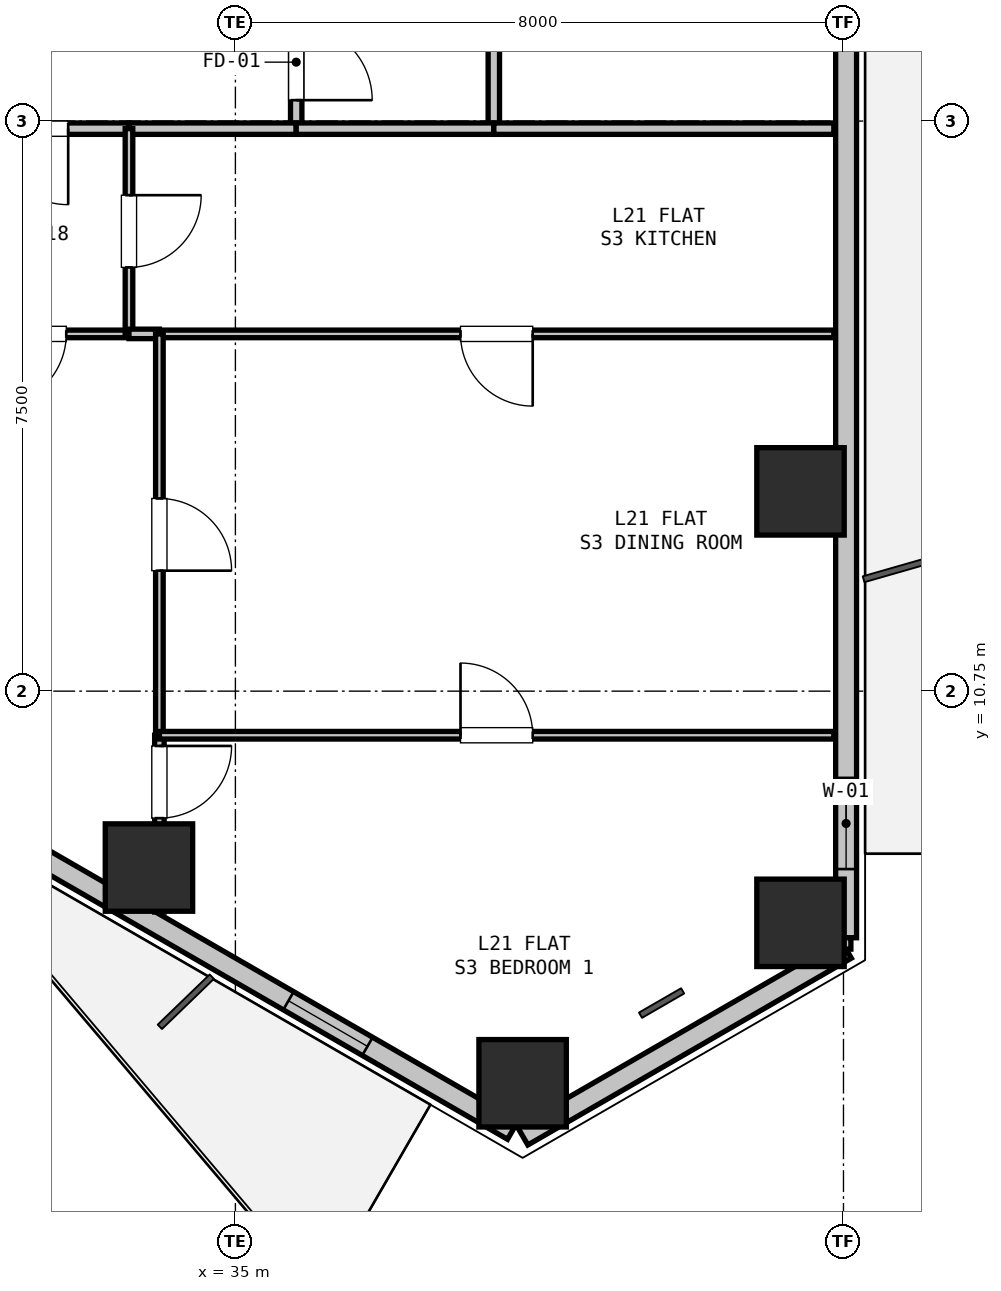
"""IFC4 building model, lengths in metres.
Left out: names, types, materials, properties, quantities, classifications, styles, units other than length and angle.
Written with IfcOpenShell. Run it as: python <this file> out.ifc"""

import sys

from ifc_helpers import new_model, si_unit, direction, frame, frame_2d, origin, origin_2d, place, context, subcontext, project, spatial, rectangle, hollow_rectangle, extrude, element, fill, save


model = new_model("IFC4")
c1 = context("Model", 3, precision=1e-05, world=origin(), true_north=direction((0.0, 1.0)))
c2 = subcontext(c1, "Body", "Model", "MODEL_VIEW")
j1 = project(units=[si_unit("LENGTHUNIT", "METRE"), si_unit("PLANEANGLEUNIT", "RADIAN")], contexts=[c1])
p1 = place(None, origin())
s1 = spatial("IfcSite", under=j1, at=p1, CompositionType="ELEMENT")
p2 = place(p1, origin())
s2 = spatial("IfcBuilding", under=s1, at=p2, CompositionType="ELEMENT")
p3 = place(p2, frame((0.0, 0.0, 80.1)))
s3 = spatial("IfcBuildingStorey", under=s2, at=p3, CompositionType="ELEMENT", Elevation=80.1)
for number, where, z_axis, x_axis in (
    (1, (42.435, 13.378, 0.0), (0.0, 0.0, 1.0), (1.0, 0.0, 0.0)),
    (2, (42.435, 7.702, 0.0), (0.0, 0.0, 1.0), (1.0, 0.0, 0.0)),
    (3, (38.779, 5.591, 0.0), (0.0, 0.0, 1.0), (1.0, 0.0, 0.0)),
    (4, (33.863, 8.429, 0.0), (0.0, 0.0, 1.0), (1.0, 0.0, 0.0)),
):
    element("IfcColumn", number, at=place(p3, frame(where, z_axis=z_axis, x_axis=x_axis)), inside=s3, PredefinedType="COLUMN", context=c2, shape_type="SweptSolid", body=[
        extrude(hollow_rectangle(XDim=1.15, YDim=1.15, WallThickness=0.032, at=origin_2d()), origin(), (0.0, 0.0, 1.0), 3.3),
    ])
p4 = place(p3, frame((43.035, 7.356, 0.0), z_axis=(0.0, 0.0, 1.0), x_axis=(-0.866011848704, -0.500023477353, 0.0)))
e5 = element("IfcWall", 5, at=p4, inside=s3, PredefinedType="SOLIDWALL", context=c2, shape_type="SweptSolid", body=[
    extrude(rectangle(XDim=4.914, YDim=0.275, at=frame_2d((2.457, 0.0))), origin(), (0.0, 0.0, 1.0), 2.67),
])
p5 = place(p3, frame((43.035, 19.435, 0.0), z_axis=(0.0, 0.0, 1.0), x_axis=(0.0, -1.0, 0.0)))
e6 = element("IfcWall", 6, at=p5, inside=s3, PredefinedType="SOLIDWALL", context=c2, shape_type="SweptSolid", body=[
    extrude(rectangle(XDim=11.93, YDim=0.275, at=frame_2d((5.965, 0.0))), origin(), (0.0, 0.0, 1.0), 2.67),
])
p6 = place(p5, frame((9.826, 0.0, 0.9)))
e7 = element("IfcOpeningElement", 7, at=p6, cuts=e6, PredefinedType="OPENING", context=c2, shape_type="SweptSolid", body=[
    extrude(rectangle(XDim=1.2, YDim=1.4, at=frame_2d((0.6, 0.7))), frame((0.0, 0.147, 0.0), z_axis=(0.0, -1.0, 0.0), x_axis=(1.0, 0.0, 0.0)), (0.0, 0.0, 1.0), 0.295),
])
p7 = place(p3, frame((38.649, 4.973, 0.0), z_axis=(0.0, 0.0, 1.0), x_axis=(-0.866023023012, 0.500004123596, 0.0)))
e8 = element("IfcWall", 8, at=p7, inside=s3, PredefinedType="SOLIDWALL", context=c2, shape_type="SweptSolid", body=[
    extrude(rectangle(XDim=11.93, YDim=0.275, at=frame_2d((5.965, 0.0))), origin(), (0.0, 0.0, 1.0), 2.67),
])
p8 = place(p7, frame((7.616, 0.0, 0.0)))
e9 = element("IfcOpeningElement", 9, at=p8, cuts=e8, PredefinedType="OPENING", context=c2, shape_type="SweptSolid", body=[
    extrude(rectangle(XDim=1.1, YDim=2.1, at=frame_2d((0.55, 1.05))), frame((0.0, 0.147, 0.0), z_axis=(0.0, -1.0, 0.0), x_axis=(1.0, 0.0, 0.0)), (0.0, 0.0, 1.0), 0.295),
])
p9 = place(p7, frame((2.207, 0.0, 0.9)))
e10 = element("IfcOpeningElement", 10, at=p9, cuts=e8, PredefinedType="OPENING", context=c2, shape_type="SweptSolid", body=[
    extrude(rectangle(XDim=1.2, YDim=1.4, at=frame_2d((0.6, 0.7))), frame((0.0, 0.147, 0.0), z_axis=(0.0, -1.0, 0.0), x_axis=(1.0, 0.0, 0.0)), (0.0, 0.0, 1.0), 0.295),
])
p10 = place(p3, frame((35.8, 19.9, 0.0), z_axis=(0.0, 0.0, 1.0), x_axis=(0.0, -1.0, 0.0)))
e11 = element("IfcWall", 11, at=p10, inside=s3, PredefinedType="PARTITIONING", context=c2, shape_type="SweptSolid", body=[
    extrude(rectangle(XDim=1.75, YDim=0.15, at=frame_2d((0.875, 0.0))), origin(), (0.0, 0.0, 1.0), 3.05),
])
p11 = place(p10, frame((0.375, 0.0, 0.0)))
e12 = element("IfcOpeningElement", 12, at=p11, cuts=e11, PredefinedType="OPENING", context=c2, shape_type="SweptSolid", body=[
    extrude(rectangle(XDim=1.0, YDim=2.15, at=frame_2d((0.5, 1.075))), frame((0.0, 0.085, 0.0), z_axis=(0.0, -1.0, 0.0), x_axis=(1.0, 0.0, 0.0)), (0.0, 0.0, 1.0), 0.17),
])
p12 = place(p3, frame((35.8, 18.15, 0.0), z_axis=(0.0, 0.0, 1.0), x_axis=(-1.0, 0.0, 0.0)))
e13 = element("IfcWall", 13, at=p12, inside=s3, PredefinedType="PARTITIONING", context=c2, shape_type="SweptSolid", body=[
    extrude(rectangle(XDim=2.2, YDim=0.15, at=frame_2d((1.1, 0.0))), origin(), (0.0, 0.0, 1.0), 3.05),
])
p13 = place(p3, frame((33.6, 18.15, 0.0), z_axis=(0.0, 0.0, 1.0), x_axis=(-1.0, 0.0, 0.0)))
e14 = element("IfcWall", 14, at=p13, inside=s3, PredefinedType="PARTITIONING", context=c2, shape_type="SweptSolid", body=[
    extrude(rectangle(XDim=2.6, YDim=0.15, at=frame_2d((1.3, 0.0))), origin(), (0.0, 0.0, 1.0), 3.05),
])
p14 = place(p13, frame((0.8, 0.0, 0.0)))
e15 = element("IfcOpeningElement", 15, at=p14, cuts=e14, PredefinedType="OPENING", context=c2, shape_type="SweptSolid", body=[
    extrude(rectangle(XDim=1.0, YDim=2.15, at=frame_2d((0.5, 1.075))), frame((0.0, 0.085, 0.0), z_axis=(0.0, -1.0, 0.0), x_axis=(1.0, 0.0, 0.0)), (0.0, 0.0, 1.0), 0.17),
])
p15 = place(p3, frame((38.4, 21.4, 0.0), z_axis=(0.0, 0.0, 1.0), x_axis=(0.0, -1.0, 0.0)))
e16 = element("IfcWall", 16, at=p15, inside=s3, PredefinedType="PARTITIONING", context=c2, shape_type="SweptSolid", body=[
    extrude(rectangle(XDim=3.25, YDim=0.15, at=frame_2d((1.625, 0.0))), origin(), (0.0, 0.0, 1.0), 3.05),
])
p16 = place(p3, frame((38.4, 18.15, 0.0), z_axis=(0.0, 0.0, 1.0), x_axis=(-1.0, 0.0, 0.0)))
e17 = element("IfcWall", 17, at=p16, inside=s3, PredefinedType="PARTITIONING", context=c2, shape_type="SweptSolid", body=[
    extrude(rectangle(XDim=2.6, YDim=0.15, at=frame_2d((1.3, 0.0))), origin(), (0.0, 0.0, 1.0), 2.423),
])
p17 = place(p3, frame((33.6, 15.45, 0.0), z_axis=(0.0, 0.0, 1.0), x_axis=(-1.0, 0.0, 0.0)))
e18 = element("IfcWall", 18, at=p17, inside=s3, PredefinedType="PARTITIONING", context=c2, shape_type="SweptSolid", body=[
    extrude(rectangle(XDim=2.6, YDim=0.1, at=frame_2d((1.3, 0.0))), origin(), (0.0, 0.0, 1.0), 3.05),
])
p18 = place(p17, frame((0.825, 0.0, 0.0)))
e19 = element("IfcOpeningElement", 19, at=p18, cuts=e18, PredefinedType="OPENING", context=c2, shape_type="SweptSolid", body=[
    extrude(rectangle(XDim=0.95, YDim=2.1, at=frame_2d((0.475, 1.05))), frame((0.0, 0.06, 0.0), z_axis=(0.0, -1.0, 0.0), x_axis=(1.0, 0.0, 0.0)), (0.0, 0.0, 1.0), 0.12),
])
p19 = place(p3, frame((33.6, 18.15, 0.0), z_axis=(0.0, 0.0, 1.0), x_axis=(0.0, -1.0, 0.0)))
e20 = element("IfcWall", 20, at=p19, inside=s3, PredefinedType="PARTITIONING", context=c2, shape_type="SweptSolid", body=[
    extrude(rectangle(XDim=2.7, YDim=0.1, at=frame_2d((1.35, 0.0))), origin(), (0.0, 0.0, 1.0), 3.05),
])
p20 = place(p19, frame((0.875, 0.0, 0.0)))
e21 = element("IfcOpeningElement", 21, at=p20, cuts=e20, PredefinedType="OPENING", context=c2, shape_type="SweptSolid", body=[
    extrude(rectangle(XDim=0.95, YDim=2.1, at=frame_2d((0.475, 1.05))), frame((0.0, 0.06, 0.0), z_axis=(0.0, -1.0, 0.0), x_axis=(1.0, 0.0, 0.0)), (0.0, 0.0, 1.0), 0.12),
])
p21 = place(p3, frame((38.4, 18.15, 0.0), z_axis=(0.0, 0.0, 1.0), x_axis=(1.0, 0.0, 0.0)))
e22 = element("IfcWall", 22, at=p21, inside=s3, PredefinedType="PARTITIONING", context=c2, shape_type="SweptSolid", body=[
    extrude(rectangle(XDim=4.473, YDim=0.15, at=frame_2d((2.237, 0.0))), origin(), (0.0, 0.0, 1.0), 2.365),
])
p22 = place(p3, frame((42.873, 15.45, 0.0), z_axis=(0.0, 0.0, 1.0), x_axis=(-1.0, 0.0, 0.0)))
e23 = element("IfcWall", 23, at=p22, inside=s3, PredefinedType="PARTITIONING", context=c2, shape_type="SweptSolid", body=[
    extrude(rectangle(XDim=8.873, YDim=0.1, at=frame_2d((4.437, 0.0))), origin(), (0.0, 0.0, 1.0), 2.365),
])
p23 = place(p22, frame((3.962, 0.0, 0.0)))
e24 = element("IfcOpeningElement", 24, at=p23, cuts=e23, PredefinedType="OPENING", context=c2, shape_type="SweptSolid", body=[
    extrude(rectangle(XDim=0.95, YDim=2.1, at=frame_2d((0.475, 1.05))), frame((0.0, 0.06, 0.0), z_axis=(0.0, -1.0, 0.0), x_axis=(1.0, 0.0, 0.0)), (0.0, 0.0, 1.0), 0.12),
])
p24 = place(p3, frame((34.0, 15.45, 0.0), z_axis=(0.0, 0.0, 1.0), x_axis=(-1.0, 0.0, 0.0)))
e25 = element("IfcWall", 25, at=p24, inside=s3, PredefinedType="PARTITIONING", context=c2, shape_type="SweptSolid", body=[
    extrude(rectangle(XDim=0.4, YDim=0.125, at=frame_2d((0.2, 0.0))), origin(), (0.0, 0.0, 1.0), 3.05),
])
p25 = place(p3, frame((34.0, 15.45, 0.0), z_axis=(0.0, 0.0, 1.0), x_axis=(0.0, -1.0, 0.0)))
e26 = element("IfcWall", 26, at=p25, inside=s3, PredefinedType="PARTITIONING", context=c2, shape_type="SweptSolid", body=[
    extrude(rectangle(XDim=5.28, YDim=0.1, at=frame_2d((2.64, 0.0))), origin(), (0.0, 0.0, 1.0), 3.05),
])
p26 = place(p25, frame((2.165, 0.0, 0.0)))
e27 = element("IfcOpeningElement", 27, at=p26, cuts=e26, PredefinedType="OPENING", context=c2, shape_type="SweptSolid", body=[
    extrude(rectangle(XDim=0.95, YDim=2.1, at=frame_2d((0.475, 1.05))), frame((0.0, 0.06, 0.0), z_axis=(0.0, -1.0, 0.0), x_axis=(1.0, 0.0, 0.0)), (0.0, 0.0, 1.0), 0.12),
])
p27 = place(p3, frame((34.0, 10.17, 0.0), z_axis=(0.0, 0.0, 1.0), x_axis=(0.0, -1.0, 0.0)))
e28 = element("IfcWall", 28, at=p27, inside=s3, PredefinedType="PARTITIONING", context=c2, shape_type="SweptSolid", body=[
    extrude(rectangle(XDim=2.326, YDim=0.125, at=frame_2d((1.163, 0.0))), origin(), (0.0, 0.0, 1.0), 3.05),
])
p28 = place(p27, frame((0.141, 0.0, 0.0)))
e29 = element("IfcOpeningElement", 29, at=p28, cuts=e28, PredefinedType="OPENING", context=c2, shape_type="SweptSolid", body=[
    extrude(rectangle(XDim=0.95, YDim=2.1, at=frame_2d((0.475, 1.05))), frame((0.0, 0.073, 0.0), z_axis=(0.0, -1.0, 0.0), x_axis=(1.0, 0.0, 0.0)), (0.0, 0.0, 1.0), 0.145),
])
p29 = place(p3, frame((34.0, 10.17, 0.0), z_axis=(0.0, 0.0, 1.0), x_axis=(1.0, 0.0, 0.0)))
e30 = element("IfcWall", 30, at=p29, inside=s3, PredefinedType="PARTITIONING", context=c2, shape_type="SweptSolid", body=[
    extrude(rectangle(XDim=8.873, YDim=0.1, at=frame_2d((4.437, 0.0))), origin(), (0.0, 0.0, 1.0), 2.423),
])
p30 = place(p29, frame((3.962, 0.0, 0.0)))
e31 = element("IfcOpeningElement", 31, at=p30, cuts=e30, PredefinedType="OPENING", context=c2, shape_type="SweptSolid", body=[
    extrude(rectangle(XDim=0.95, YDim=2.1, at=frame_2d((0.475, 1.05))), frame((0.0, 0.06, 0.0), z_axis=(0.0, -1.0, 0.0), x_axis=(1.0, 0.0, 0.0)), (0.0, 0.0, 1.0), 0.12),
])
p31 = place(p3, frame((43.035, 7.506, 0.0), z_axis=(0.0, 0.0, 1.0), x_axis=(0.0, -1.0, 0.0)))
e32 = element("IfcWall", 32, at=p31, inside=s3, PredefinedType="PARTITIONING", context=c2, shape_type="SweptSolid", body=[
    extrude(rectangle(XDim=0.15, YDim=0.125, at=frame_2d((0.075, 0.0))), origin(), (0.0, 0.0, 1.0), 3.05),
])
p32 = place(p6, origin())
e33 = element("IfcWindow", 33, at=p32, inside=s3, PartitioningType="SINGLE_PANEL", PredefinedType="WINDOW", context=c2, shape_type="SweptSolid", body=[
    extrude(rectangle(XDim=1.2, YDim=1.4, at=frame_2d((0.6, 0.7))), frame((0.0, 0.03, 0.0), z_axis=(0.0, -1.0, 0.0), x_axis=(1.0, 0.0, 0.0)), (0.0, 0.0, 1.0), 0.06),
])
fill(e7, e33)
p33 = place(p9, origin())
e34 = element("IfcWindow", 34, at=p33, inside=s3, PartitioningType="SINGLE_PANEL", PredefinedType="WINDOW", context=c2, shape_type="SweptSolid", body=[
    extrude(rectangle(XDim=1.2, YDim=1.4, at=frame_2d((0.6, 0.7))), frame((0.0, 0.03, 0.0), z_axis=(0.0, -1.0, 0.0), x_axis=(1.0, 0.0, 0.0)), (0.0, 0.0, 1.0), 0.06),
])
fill(e10, e34)
p34 = place(p11, origin())
e35 = element("IfcDoor", 35, at=p34, inside=s3, OperationType="SINGLE_SWING_RIGHT", PredefinedType="DOOR", context=c2, shape_type="SweptSolid", body=[
    extrude(rectangle(XDim=1.0, YDim=2.15, at=frame_2d((0.5, 1.075))), frame((0.0, 0.025, 0.0), z_axis=(0.0, -1.0, 0.0), x_axis=(1.0, 0.0, 0.0)), (0.0, 0.0, 1.0), 0.05),
])
fill(e12, e35)
p35 = place(p14, origin())
e36 = element("IfcDoor", 36, at=p35, inside=s3, OperationType="SINGLE_SWING_LEFT", PredefinedType="DOOR", context=c2, shape_type="SweptSolid", body=[
    extrude(rectangle(XDim=1.0, YDim=2.15, at=frame_2d((0.5, 1.075))), frame((0.0, 0.025, 0.0), z_axis=(0.0, -1.0, 0.0), x_axis=(1.0, 0.0, 0.0)), (0.0, 0.0, 1.0), 0.05),
])
fill(e15, e36)
p36 = place(p20, origin())
e37 = element("IfcDoor", 37, at=p36, inside=s3, OperationType="SINGLE_SWING_LEFT", PredefinedType="DOOR", context=c2, shape_type="SweptSolid", body=[
    extrude(rectangle(XDim=0.95, YDim=2.1, at=frame_2d((0.475, 1.05))), frame((0.0, 0.025, 0.0), z_axis=(0.0, -1.0, 0.0), x_axis=(1.0, 0.0, 0.0)), (0.0, 0.0, 1.0), 0.05),
])
fill(e21, e37)
p37 = place(p18, origin())
e38 = element("IfcDoor", 38, at=p37, inside=s3, OperationType="SINGLE_SWING_RIGHT", PredefinedType="DOOR", context=c2, shape_type="SweptSolid", body=[
    extrude(rectangle(XDim=0.95, YDim=2.1, at=frame_2d((0.475, 1.05))), frame((0.0, 0.025, 0.0), z_axis=(0.0, -1.0, 0.0), x_axis=(1.0, 0.0, 0.0)), (0.0, 0.0, 1.0), 0.05),
])
fill(e19, e38)
p38 = place(p23, origin())
e39 = element("IfcDoor", 39, at=p38, inside=s3, OperationType="SINGLE_SWING_LEFT", PredefinedType="DOOR", context=c2, shape_type="SweptSolid", body=[
    extrude(rectangle(XDim=0.95, YDim=2.1, at=frame_2d((0.475, 1.05))), frame((0.0, 0.025, 0.0), z_axis=(0.0, -1.0, 0.0), x_axis=(1.0, 0.0, 0.0)), (0.0, 0.0, 1.0), 0.05),
])
fill(e24, e39)
p39 = place(p28, origin())
e40 = element("IfcDoor", 40, at=p39, inside=s3, OperationType="SINGLE_SWING_LEFT", PredefinedType="DOOR", context=c2, shape_type="SweptSolid", body=[
    extrude(rectangle(XDim=0.95, YDim=2.1, at=frame_2d((0.475, 1.05))), frame((0.0, 0.025, 0.0), z_axis=(0.0, -1.0, 0.0), x_axis=(1.0, 0.0, 0.0)), (0.0, 0.0, 1.0), 0.05),
])
fill(e29, e40)
p40 = place(p26, origin())
e41 = element("IfcDoor", 41, at=p40, inside=s3, OperationType="SINGLE_SWING_RIGHT", PredefinedType="DOOR", context=c2, shape_type="SweptSolid", body=[
    extrude(rectangle(XDim=0.95, YDim=2.1, at=frame_2d((0.475, 1.05))), frame((0.0, 0.025, 0.0), z_axis=(0.0, -1.0, 0.0), x_axis=(1.0, 0.0, 0.0)), (0.0, 0.0, 1.0), 0.05),
])
fill(e27, e41)
p41 = place(p30, origin())
e42 = element("IfcDoor", 42, at=p41, inside=s3, OperationType="SINGLE_SWING_LEFT", PredefinedType="DOOR", context=c2, shape_type="SweptSolid", body=[
    extrude(rectangle(XDim=0.95, YDim=2.1, at=frame_2d((0.475, 1.05))), frame((0.0, 0.025, 0.0), z_axis=(0.0, -1.0, 0.0), x_axis=(1.0, 0.0, 0.0)), (0.0, 0.0, 1.0), 0.05),
])
fill(e31, e42)
save(model, sys.argv[1])
